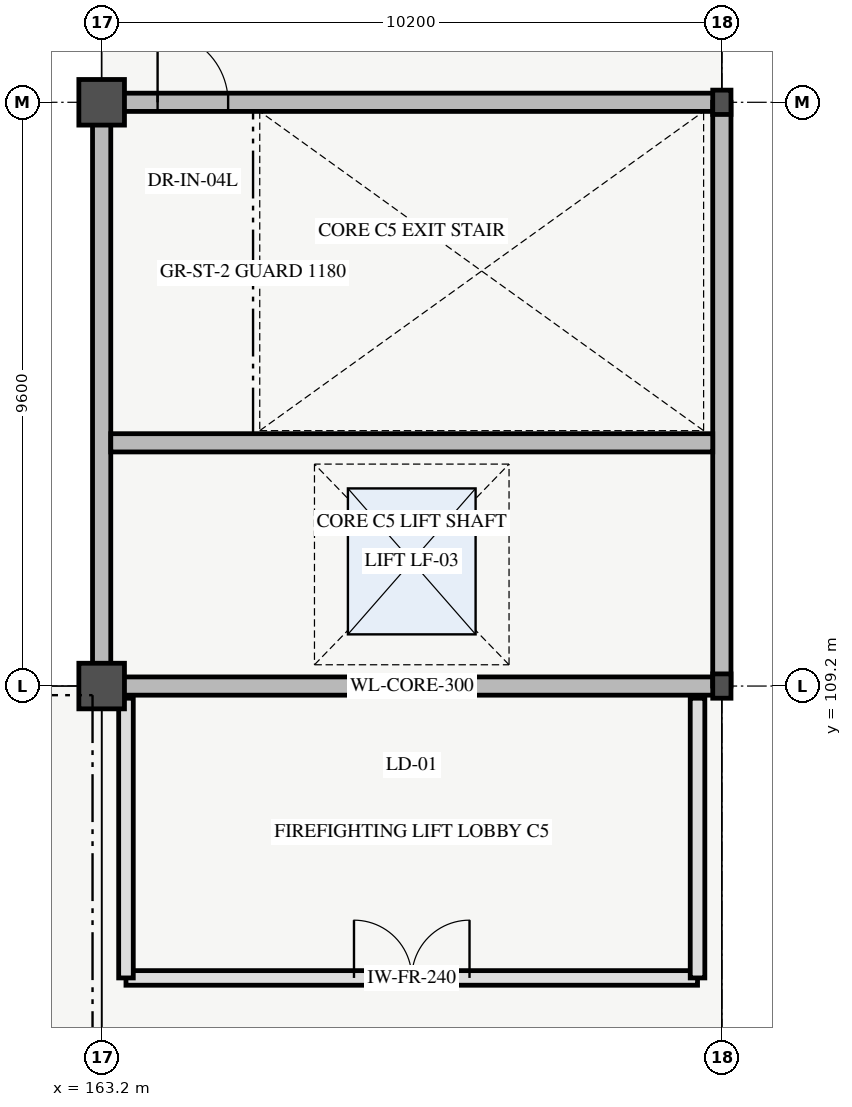
"""IFC4 building model, lengths in metres.
Left out: names, types, materials, properties, quantities, classifications, styles, units other than length and angle.
Written with IfcOpenShell. Run it as: python <this file> out.ifc"""

import sys

from ifc_helpers import new_model, si_unit, direction, frame, frame_2d, origin, origin_2d, place, context, subcontext, project, spatial, rectangle, i_section, extrude, element, fill, save


model = new_model("IFC4")
c1 = context("Model", 3, precision=1e-05, world=origin(), true_north=direction((0.0, 1.0)))
c2 = subcontext(c1, "Body", "Model", "MODEL_VIEW")
j1 = project(units=[si_unit("LENGTHUNIT", "METRE"), si_unit("PLANEANGLEUNIT", "RADIAN")], contexts=[c1])
p1 = place(None, origin())
s1 = spatial("IfcSite", under=j1, at=p1, CompositionType="ELEMENT")
p2 = place(p1, origin())
s2 = spatial("IfcBuilding", under=s1, at=p2, CompositionType="ELEMENT")
p3 = place(p2, frame((0.0, 0.0, 10.8)))
s3 = spatial("IfcBuildingStorey", under=s2, at=p3, CompositionType="ELEMENT", Elevation=10.8)
for number, where, z_axis, x_axis in (
    (1, (163.2, 109.2, 0.0), (0.0, 0.0, 1.0), (1.0, 0.0, 0.0)),
    (2, (163.2, 118.8, 0.0), (0.0, 0.0, 1.0), (1.0, 0.0, 0.0)),
):
    element("IfcColumn", number, at=place(p3, frame(where, z_axis=z_axis, x_axis=x_axis)), inside=s3, PredefinedType="COLUMN", context=c2, shape_type="SweptSolid", body=[
        extrude(rectangle(XDim=0.75, YDim=0.75, at=origin_2d()), origin(), (0.0, 0.0, 1.0), 4.2),
    ])
for number, where, z_axis, x_axis in (
    (3, (173.4, 109.2, 0.0), (0.0, 0.0, 1.0), (1.0, 0.0, 0.0)),
    (4, (173.4, 118.8, 0.0), (0.0, 0.0, 1.0), (1.0, 0.0, 0.0)),
):
    element("IfcColumn", number, at=place(p3, frame(where, z_axis=z_axis, x_axis=x_axis)), inside=s3, PredefinedType="COLUMN", context=c2, shape_type="SweptSolid", body=[
        extrude(i_section(OverallWidth=0.3, OverallDepth=0.4, WebThickness=0.013, FlangeThickness=0.024, FilletRadius=0.027, at=origin_2d()), origin(), (0.0, 0.0, 1.0), 4.2),
    ])
p4 = place(p3, frame((163.2, 109.2, 0.0), z_axis=(0.0, 0.0, 1.0), x_axis=(1.0, 0.0, 0.0)))
e5 = element("IfcWall", 5, at=p4, inside=s3, PredefinedType="SHEAR", context=c2, shape_type="SweptSolid", body=[
    extrude(rectangle(XDim=10.2, YDim=0.3, at=frame_2d((5.1, 0.0))), origin(), (0.0, 0.0, 1.0), 4.2),
])
p5 = place(p4, frame((4.5, 0.0, 0.0)))
e6 = element("IfcOpeningElement", 6, at=p5, cuts=e5, PredefinedType="OPENING", context=c2, shape_type="SweptSolid", body=[
    extrude(rectangle(XDim=1.2, YDim=2.25, at=frame_2d((0.6, 1.125))), frame((0.0, 0.16, 0.0), z_axis=(0.0, -1.0, 0.0), x_axis=(1.0, 0.0, 0.0)), (0.0, 0.0, 1.0), 0.32),
])
p6 = place(p3, frame((163.2, 118.8, 0.0), z_axis=(0.0, 0.0, 1.0), x_axis=(1.0, 0.0, 0.0)))
e7 = element("IfcWall", 7, at=p6, inside=s3, PredefinedType="SHEAR", context=c2, shape_type="SweptSolid", body=[
    extrude(rectangle(XDim=10.2, YDim=0.3, at=frame_2d((5.1, 0.0))), origin(), (0.0, 0.0, 1.0), 4.2),
])
p7 = place(p6, frame((0.92, 0.0, 0.0)))
e8 = element("IfcOpeningElement", 8, at=p7, cuts=e7, PredefinedType="OPENING", context=c2, shape_type="SweptSolid", body=[
    extrude(rectangle(XDim=1.16, YDim=2.2, at=frame_2d((0.58, 1.1))), frame((0.0, 0.16, 0.0), z_axis=(0.0, -1.0, 0.0), x_axis=(1.0, 0.0, 0.0)), (0.0, 0.0, 1.0), 0.32),
])
for number, where, z_axis, x_axis in (
    (9, (163.2, 109.2, 0.0), (0.0, 0.0, 1.0), (0.0, 1.0, 0.0)),
    (10, (173.4, 109.2, 0.0), (0.0, 0.0, 1.0), (0.0, 1.0, 0.0)),
):
    element("IfcWall", number, at=place(p3, frame(where, z_axis=z_axis, x_axis=x_axis)), inside=s3, PredefinedType="SHEAR", context=c2, shape_type="SweptSolid", body=[
        extrude(rectangle(XDim=9.6, YDim=0.3, at=frame_2d((4.8, 0.0))), origin(), (0.0, 0.0, 1.0), 4.2),
    ])
p8 = place(p3, frame((163.35, 113.2, 0.0), z_axis=(0.0, 0.0, 1.0), x_axis=(1.0, 0.0, 0.0)))
e11 = element("IfcWall", 11, at=p8, inside=s3, PredefinedType="SHEAR", context=c2, shape_type="SweptSolid", body=[
    extrude(rectangle(XDim=9.9, YDim=0.3, at=frame_2d((4.95, 0.0))), origin(), (0.0, 0.0, 1.0), 4.2),
])
p9 = place(p3, frame((163.6, 104.4, 0.0), z_axis=(0.0, 0.0, 1.0), x_axis=(1.0, 0.0, 0.0)))
e12 = element("IfcWall", 12, at=p9, inside=s3, PredefinedType="PARTITIONING", context=c2, shape_type="SweptSolid", body=[
    extrude(rectangle(XDim=9.4, YDim=0.24, at=frame_2d((4.7, 0.0))), origin(), (0.0, 0.0, 1.0), 3.06),
])
p10 = place(p9, frame((3.75, 0.0, 0.0)))
e13 = element("IfcOpeningElement", 13, at=p10, cuts=e12, PredefinedType="OPENING", context=c2, shape_type="SweptSolid", body=[
    extrude(rectangle(XDim=1.9, YDim=2.25, at=frame_2d((0.95, 1.125))), frame((0.0, 0.13, 0.0), z_axis=(0.0, -1.0, 0.0), x_axis=(1.0, 0.0, 0.0)), (0.0, 0.0, 1.0), 0.26),
])
for number, where, z_axis, x_axis in (
    (14, (163.6, 104.4, 0.0), (0.0, 0.0, 1.0), (0.0, 1.0, 0.0)),
    (15, (173.0, 104.4, 0.0), (0.0, 0.0, 1.0), (0.0, 1.0, 0.0)),
):
    element("IfcWall", number, at=place(p3, frame(where, z_axis=z_axis, x_axis=x_axis)), inside=s3, PredefinedType="PARTITIONING", context=c2, shape_type="SweptSolid", body=[
        extrude(rectangle(XDim=4.6, YDim=0.24, at=frame_2d((2.3, 0.0))), origin(), (0.0, 0.0, 1.0), 3.06),
    ])
p11 = place(p7, origin())
e16 = element("IfcDoor", 16, at=p11, inside=s3, OperationType="SINGLE_SWING_LEFT", PredefinedType="DOOR", context=c2, shape_type="SweptSolid", body=[
    extrude(rectangle(XDim=1.16, YDim=2.2, at=frame_2d((0.58, 1.1))), frame((0.0, 0.025, 0.0), z_axis=(0.0, -1.0, 0.0), x_axis=(1.0, 0.0, 0.0)), (0.0, 0.0, 1.0), 0.05),
])
fill(e8, e16)
p12 = place(p5, origin())
e17 = element("IfcDoor", 17, at=p12, inside=s3, OperationType="SLIDING_TO_LEFT", PredefinedType="DOOR", context=c2, shape_type="SweptSolid", body=[
    extrude(rectangle(XDim=1.2, YDim=2.25, at=frame_2d((0.6, 1.125))), frame((0.0, 0.025, 0.0), z_axis=(0.0, -1.0, 0.0), x_axis=(1.0, 0.0, 0.0)), (0.0, 0.0, 1.0), 0.05),
])
fill(e6, e17)
p13 = place(p10, origin())
e18 = element("IfcDoor", 18, at=p13, inside=s3, OperationType="DOUBLE_DOOR_SINGLE_SWING", PredefinedType="DOOR", context=c2, shape_type="SweptSolid", body=[
    extrude(rectangle(XDim=1.9, YDim=2.25, at=frame_2d((0.95, 1.125))), frame((0.0, 0.025, 0.0), z_axis=(0.0, -1.0, 0.0), x_axis=(1.0, 0.0, 0.0)), (0.0, 0.0, 1.0), 0.05),
])
fill(e13, e18)
save(model, sys.argv[1])
